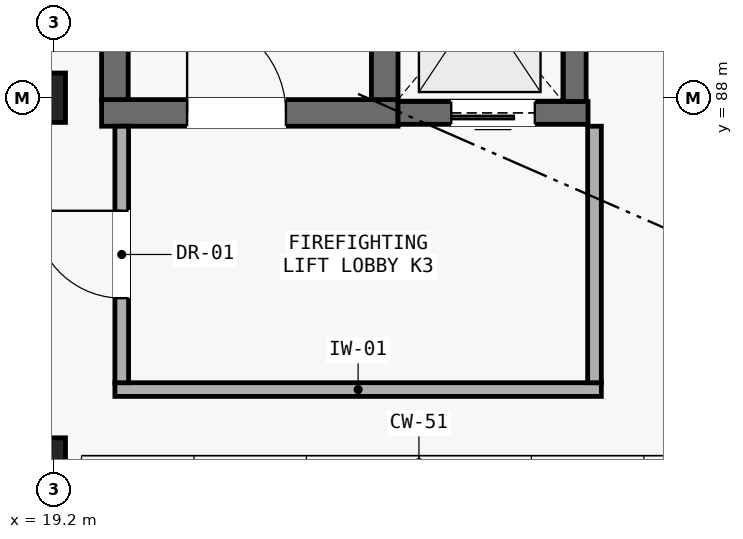
"""IFC4 building model, lengths in metres.
Left out: names, types, materials, properties, quantities, classifications, styles, units other than length and angle.
Written with IfcOpenShell. Run it as: python <this file> out.ifc"""

import sys

from ifc_helpers import new_model, si_unit, direction, frame, frame_2d, origin, origin_2d, place, context, subcontext, project, spatial, rectangle, i_section, extrude, element, fill, save


model = new_model("IFC4")
c1 = context("Model", 3, precision=1e-05, world=origin(), true_north=direction((0.0, 1.0)))
c2 = subcontext(c1, "Body", "Model", "MODEL_VIEW")
j1 = project(units=[si_unit("LENGTHUNIT", "METRE"), si_unit("PLANEANGLEUNIT", "RADIAN")], contexts=[c1])
p1 = place(None, origin())
s1 = spatial("IfcSite", under=j1, at=p1, CompositionType="ELEMENT")
p2 = place(p1, origin())
s2 = spatial("IfcBuilding", under=s1, at=p2, CompositionType="ELEMENT")
p3 = place(p2, origin())
s3 = spatial("IfcBuildingStorey", under=s2, at=p3, CompositionType="ELEMENT", Elevation=0.0)
for number, where, z_axis, x_axis in (
    (1, (19.2, 83.2, 0.0), (0.0, 0.0, 1.0), (1.0, 0.0, 0.0)),
    (2, (19.2, 88.0, 0.0), (0.0, 0.0, 1.0), (1.0, 0.0, 0.0)),
):
    element("IfcColumn", number, at=place(p3, frame(where, z_axis=z_axis, x_axis=x_axis)), inside=s3, PredefinedType="COLUMN", context=c2, shape_type="SweptSolid", body=[
        extrude(i_section(OverallWidth=0.3, OverallDepth=0.65, WebThickness=0.016, FlangeThickness=0.031, FilletRadius=0.027, at=origin_2d()), origin(), (0.0, 0.0, 1.0), 5.25),
    ])
p4 = place(p3, frame((19.825, 87.8, 0.0), z_axis=(0.0, 0.0, 1.0), x_axis=(1.0, 0.0, 0.0)))
e3 = element("IfcWall", 3, at=p4, inside=s3, PredefinedType="SHEAR", context=c2, shape_type="SweptSolid", body=[
    extrude(rectangle(XDim=3.9, YDim=0.35, at=frame_2d((1.95, 0.0))), origin(), (0.0, 0.0, 1.0), 5.0),
])
p5 = place(p4, frame((1.125, 0.0, 0.0)))
e4 = element("IfcOpeningElement", 4, at=p5, cuts=e3, PredefinedType="OPENING", context=c2, shape_type="SweptSolid", body=[
    extrude(rectangle(XDim=1.3, YDim=2.15, at=frame_2d((0.65, 1.075))), frame((0.0, 0.185, 0.0), z_axis=(0.0, -1.0, 0.0), x_axis=(1.0, 0.0, 0.0)), (0.0, 0.0, 1.0), 0.37),
])
for number, where, z_axis, x_axis in (
    (5, (20.0, 87.975, 0.0), (0.0, 0.0, 1.0), (0.0, 1.0, 0.0)),
    (6, (23.55, 87.975, 0.0), (0.0, 0.0, 1.0), (0.0, 1.0, 0.0)),
):
    element("IfcWall", number, at=place(p3, frame(where, z_axis=z_axis, x_axis=x_axis)), inside=s3, PredefinedType="SHEAR", context=c2, shape_type="SweptSolid", body=[
        extrude(rectangle(XDim=7.6, YDim=0.35, at=frame_2d((3.8, 0.0))), origin(), (0.0, 0.0, 1.0), 5.0),
    ])
p6 = place(p3, frame((23.725, 87.8, 0.0), z_axis=(0.0, 0.0, 1.0), x_axis=(1.0, 0.0, 0.0)))
e7 = element("IfcWall", 7, at=p6, inside=s3, PredefinedType="SHEAR", context=c2, shape_type="SweptSolid", body=[
    extrude(rectangle(XDim=2.5, YDim=0.3, at=frame_2d((1.25, 0.0))), origin(), (0.0, 0.0, 1.0), 5.0),
])
p7 = place(p6, frame((0.7, 0.0, 0.0)))
e8 = element("IfcOpeningElement", 8, at=p7, cuts=e7, PredefinedType="OPENING", context=c2, shape_type="SweptSolid", body=[
    extrude(rectangle(XDim=1.1, YDim=2.1, at=frame_2d((0.55, 1.05))), frame((0.0, 0.16, 0.0), z_axis=(0.0, -1.0, 0.0), x_axis=(1.0, 0.0, 0.0)), (0.0, 0.0, 1.0), 0.32),
])
p8 = place(p3, frame((26.05, 87.95, 0.0), z_axis=(0.0, 0.0, 1.0), x_axis=(0.0, 1.0, 0.0)))
e9 = element("IfcWall", 9, at=p8, inside=s3, PredefinedType="SHEAR", context=c2, shape_type="SweptSolid", body=[
    extrude(rectangle(XDim=2.65, YDim=0.3, at=frame_2d((1.325, 0.0))), origin(), (0.0, 0.0, 1.0), 5.0),
])
p9 = place(p3, frame((20.0, 84.16, 0.0), z_axis=(0.0, 0.0, 1.0), x_axis=(1.0, 0.0, 0.0)))
e10 = element("IfcWall", 10, at=p9, inside=s3, PredefinedType="PARTITIONING", context=c2, shape_type="SweptSolid", body=[
    extrude(rectangle(XDim=6.4, YDim=0.18, at=frame_2d((3.2, 0.0))), origin(), (0.0, 0.0, 1.0), 5.0),
])
p10 = place(p3, frame((20.09, 84.25, 0.0), z_axis=(0.0, 0.0, 1.0), x_axis=(0.0, 1.0, 0.0)))
e11 = element("IfcWall", 11, at=p10, inside=s3, PredefinedType="PARTITIONING", context=c2, shape_type="SweptSolid", body=[
    extrude(rectangle(XDim=3.375, YDim=0.18, at=frame_2d((1.688, 0.0))), origin(), (0.0, 0.0, 1.0), 5.0),
])
p11 = place(p10, frame((1.113, 0.0, 0.0)))
e12 = element("IfcOpeningElement", 12, at=p11, cuts=e11, PredefinedType="OPENING", context=c2, shape_type="SweptSolid", body=[
    extrude(rectangle(XDim=1.15, YDim=2.15, at=frame_2d((0.575, 1.075))), frame((0.0, 0.1, 0.0), z_axis=(0.0, -1.0, 0.0), x_axis=(1.0, 0.0, 0.0)), (0.0, 0.0, 1.0), 0.2),
])
p12 = place(p3, frame((26.31, 84.25, 0.0), z_axis=(0.0, 0.0, 1.0), x_axis=(0.0, 1.0, 0.0)))
e13 = element("IfcWall", 13, at=p12, inside=s3, PredefinedType="PARTITIONING", context=c2, shape_type="SweptSolid", body=[
    extrude(rectangle(XDim=3.375, YDim=0.18, at=frame_2d((1.688, 0.0))), origin(), (0.0, 0.0, 1.0), 5.0),
])
p13 = place(p5, origin())
e14 = element("IfcDoor", 14, at=p13, inside=s3, OperationType="SINGLE_SWING_LEFT", PredefinedType="DOOR", context=c2, shape_type="SweptSolid", body=[
    extrude(rectangle(XDim=1.3, YDim=2.15, at=frame_2d((0.65, 1.075))), frame((0.0, 0.025, 0.0), z_axis=(0.0, -1.0, 0.0), x_axis=(1.0, 0.0, 0.0)), (0.0, 0.0, 1.0), 0.05),
])
fill(e4, e14)
p14 = place(p7, frame((1.1, 0.0, 0.0), z_axis=(0.0, 0.0, 1.0), x_axis=(-1.0, 0.0, 0.0)))
e15 = element("IfcDoor", 15, at=p14, inside=s3, OperationType="SLIDING_TO_LEFT", PredefinedType="DOOR", context=c2, shape_type="SweptSolid", body=[
    extrude(rectangle(XDim=1.1, YDim=2.1, at=frame_2d((0.55, 1.05))), frame((0.0, 0.025, 0.0), z_axis=(0.0, -1.0, 0.0), x_axis=(1.0, 0.0, 0.0)), (0.0, 0.0, 1.0), 0.05),
])
fill(e8, e15)
p15 = place(p11, origin())
e16 = element("IfcDoor", 16, at=p15, inside=s3, OperationType="SINGLE_SWING_RIGHT", PredefinedType="DOOR", context=c2, shape_type="SweptSolid", body=[
    extrude(rectangle(XDim=1.15, YDim=2.15, at=frame_2d((0.575, 1.075))), frame((0.0, 0.025, 0.0), z_axis=(0.0, -1.0, 0.0), x_axis=(1.0, 0.0, 0.0)), (0.0, 0.0, 1.0), 0.05),
])
fill(e12, e16)
save(model, sys.argv[1])
